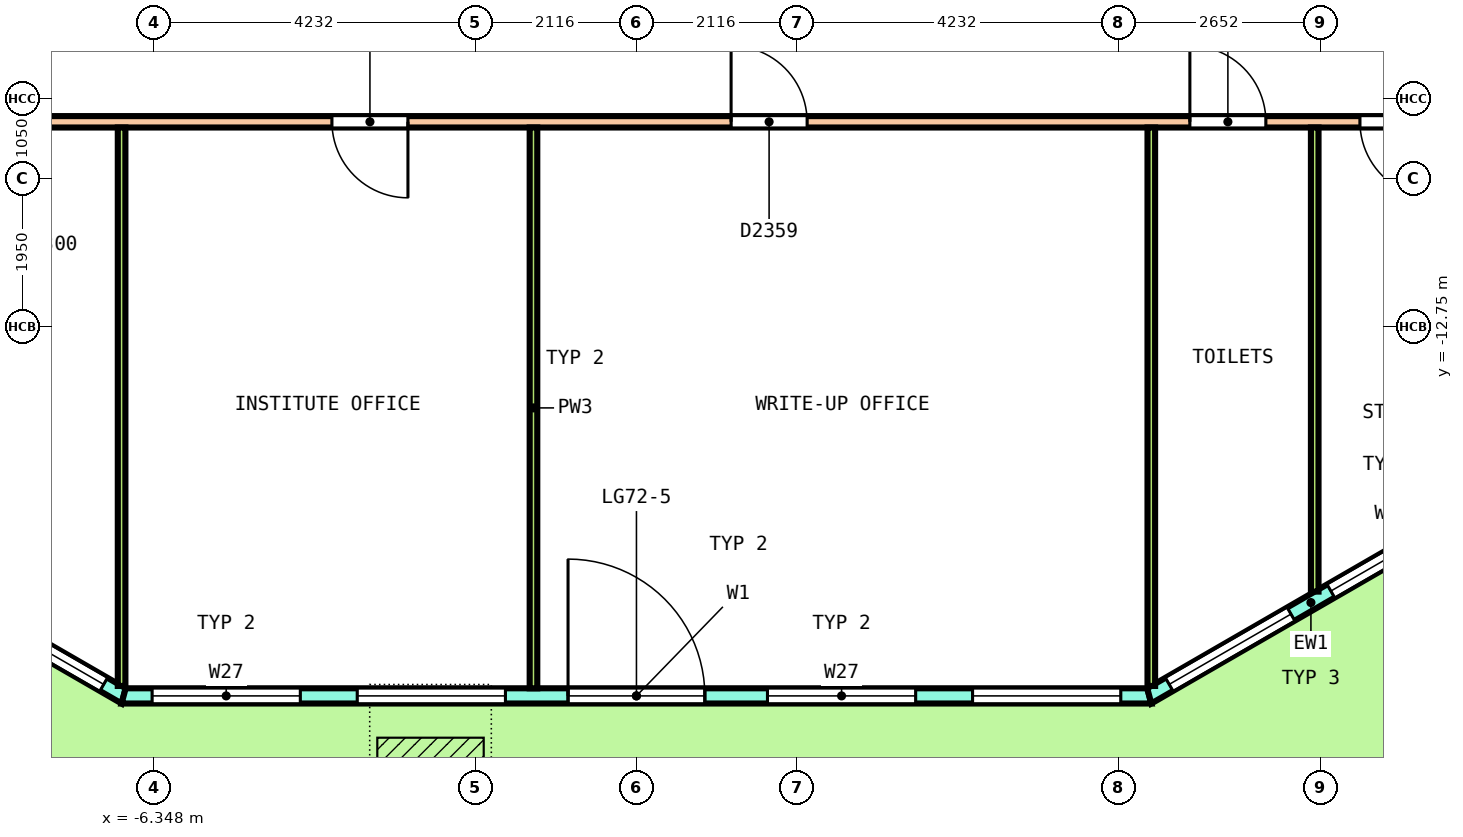
"""IFC4 building model, lengths in metres.
Left out: names, types, materials, properties, quantities, classifications, styles, units other than length and angle.
Written with IfcOpenShell. Run it as: python <this file> out.ifc"""

import sys

from ifc_helpers import new_model, si_unit, direction, frame, frame_2d, origin, origin_2d, place, context, subcontext, project, spatial, polyline, rectangle, outline, extrude, element, fill, save


model = new_model("IFC4")
c1 = context("Model", 3, precision=1e-05, world=origin(), true_north=direction((0.0, 1.0)))
c2 = subcontext(c1, "Body", "Model", "MODEL_VIEW")
j1 = project(units=[si_unit("LENGTHUNIT", "METRE"), si_unit("PLANEANGLEUNIT", "RADIAN")], contexts=[c1])
p1 = place(None, origin())
s1 = spatial("IfcSite", under=j1, at=p1, CompositionType="ELEMENT")
p2 = place(p1, origin())
s2 = spatial("IfcBuilding", under=s1, at=p2, CompositionType="ELEMENT")
p3 = place(p2, frame((0.0, 0.0, 324.6)))
s3 = spatial("IfcBuildingStorey", under=s2, at=p3, CompositionType="ELEMENT", Elevation=324.6)
p4 = place(p3, frame((10.273, -18.8, 0.0), z_axis=(-0.018115165867, -0.031417446337, 0.999342176049), x_axis=(0.865519692755, 0.499889378995, 0.031404939456)))
e1 = element("IfcColumn", 1, at=p4, inside=s3, PredefinedType="COLUMN", context=c2, shape_type="SweptSolid", body=[
    extrude(rectangle(XDim=0.85, YDim=0.85, at=origin_2d()), origin(), (0.0, 0.0, 1.0), 3.652),
])
p5 = place(p3, frame((-11.0, -15.147, 0.0), z_axis=(0.0, 0.0, 1.0), x_axis=(0.866029143232, -0.499993523031, 0.0)))
e2 = element("IfcWall", 2, at=p5, inside=s3, PredefinedType="SOLIDWALL", context=c2, shape_type="SweptSolid", body=[
    extrude(outline(polyline([(-0.027, -0.1), (1.214, -0.1), (2.456, -0.1), (3.697, -0.1), (4.938, -0.1), (4.885, 0.1), (3.67, 0.1), (2.456, 0.1), (1.241, 0.1), (0.027, 0.1), (-0.027, -0.1)])), origin(), (0.0, 0.0, 1.0), 3.7),
])
p6 = place(p5, frame((0.303, 0.0, 0.1)))
e3 = element("IfcOpeningElement", 3, at=p6, cuts=e2, PredefinedType="OPENING", context=c2, shape_type="SweptSolid", body=[
    extrude(rectangle(XDim=1.85, YDim=2.9, at=frame_2d((0.925, 1.45))), frame((0.0, 0.11, 0.0), z_axis=(0.0, -1.0, 0.0), x_axis=(1.0, 0.0, 0.0)), (0.0, 0.0, 1.0), 0.22),
])
p7 = place(p5, frame((2.759, 0.0, 0.1)))
e4 = element("IfcOpeningElement", 4, at=p7, cuts=e2, PredefinedType="OPENING", context=c2, shape_type="SweptSolid", body=[
    extrude(rectangle(XDim=1.85, YDim=2.9, at=frame_2d((0.925, 1.45))), frame((0.0, 0.11, 0.0), z_axis=(0.0, -1.0, 0.0), x_axis=(1.0, 0.0, 0.0)), (0.0, 0.0, 1.0), 0.22),
])
p8 = place(p3, frame((-6.747, -17.603, 0.0), z_axis=(0.0, 0.0, 1.0), x_axis=(1.0, 0.0, 0.0)))
e5 = element("IfcWall", 5, at=p8, inside=s3, PredefinedType="SOLIDWALL", context=c2, shape_type="SweptSolid", body=[
    extrude(outline(polyline([(-0.027, -0.1), (1.015, -0.1), (2.057, -0.1), (3.099, -0.1), (4.141, -0.1), (5.184, -0.1), (6.226, -0.1), (7.268, -0.1), (8.31, -0.1), (9.352, -0.1), (10.394, -0.1), (11.436, -0.1), (12.478, -0.1), (13.52, -0.1), (13.466, 0.1), (12.433, 0.1), (11.399, 0.1), (10.365, 0.1), (9.331, 0.1), (8.297, 0.1), (7.263, 0.1), (6.23, 0.1), (5.196, 0.1), (4.162, 0.1), (3.128, 0.1), (2.094, 0.1), (1.061, 0.1), (0.027, 0.1), (-0.027, -0.1)])), origin(), (0.0, 0.0, 1.0), 3.7),
])
p9 = place(p8, frame((0.374, 0.0, 0.1)))
e6 = element("IfcOpeningElement", 6, at=p9, cuts=e5, PredefinedType="OPENING", context=c2, shape_type="SweptSolid", body=[
    extrude(rectangle(XDim=1.95, YDim=2.9, at=frame_2d((0.975, 1.45))), frame((0.0, 0.11, 0.0), z_axis=(0.0, -1.0, 0.0), x_axis=(1.0, 0.0, 0.0)), (0.0, 0.0, 1.0), 0.22),
])
p10 = place(p8, frame((3.073, 0.0, 0.1)))
e7 = element("IfcOpeningElement", 7, at=p10, cuts=e5, PredefinedType="OPENING", context=c2, shape_type="SweptSolid", body=[
    extrude(rectangle(XDim=1.95, YDim=2.9, at=frame_2d((0.975, 1.45))), frame((0.0, 0.11, 0.0), z_axis=(0.0, -1.0, 0.0), x_axis=(1.0, 0.0, 0.0)), (0.0, 0.0, 1.0), 0.22),
])
p11 = place(p8, frame((5.847, 0.0, 0.0)))
e8 = element("IfcOpeningElement", 8, at=p11, cuts=e5, PredefinedType="OPENING", context=c2, shape_type="SweptSolid", body=[
    extrude(rectangle(XDim=1.8, YDim=2.4, at=frame_2d((0.9, 1.2))), frame((0.0, 0.11, 0.0), z_axis=(0.0, -1.0, 0.0), x_axis=(1.0, 0.0, 0.0)), (0.0, 0.0, 1.0), 0.22),
])
p12 = place(p8, frame((5.847, 0.0, 2.55)))
e9 = element("IfcOpeningElement", 9, at=p12, cuts=e5, PredefinedType="OPENING", context=c2, shape_type="SweptSolid", body=[
    extrude(rectangle(XDim=1.8, YDim=0.45, at=frame_2d((0.9, 0.225))), frame((0.0, 0.11, 0.0), z_axis=(0.0, -1.0, 0.0), x_axis=(1.0, 0.0, 0.0)), (0.0, 0.0, 1.0), 0.22),
])
p13 = place(p8, frame((8.47, 0.0, 0.1)))
e10 = element("IfcOpeningElement", 10, at=p13, cuts=e5, PredefinedType="OPENING", context=c2, shape_type="SweptSolid", body=[
    extrude(rectangle(XDim=1.95, YDim=2.9, at=frame_2d((0.975, 1.45))), frame((0.0, 0.11, 0.0), z_axis=(0.0, -1.0, 0.0), x_axis=(1.0, 0.0, 0.0)), (0.0, 0.0, 1.0), 0.22),
])
p14 = place(p8, frame((11.169, 0.0, 0.1)))
e11 = element("IfcOpeningElement", 11, at=p14, cuts=e5, PredefinedType="OPENING", context=c2, shape_type="SweptSolid", body=[
    extrude(rectangle(XDim=1.95, YDim=2.9, at=frame_2d((0.975, 1.45))), frame((0.0, 0.11, 0.0), z_axis=(0.0, -1.0, 0.0), x_axis=(1.0, 0.0, 0.0)), (0.0, 0.0, 1.0), 0.22),
])
p15 = place(p3, frame((6.747, -17.603, 0.0), z_axis=(0.0, 0.0, 1.0), x_axis=(0.866029143232, 0.499993523031, 0.0)))
e12 = element("IfcWall", 12, at=p15, inside=s3, PredefinedType="SOLIDWALL", context=c2, shape_type="SweptSolid", body=[
    extrude(outline(polyline([(-0.027, -0.1), (1.214, -0.1), (2.456, -0.1), (3.697, -0.1), (4.938, -0.1), (4.885, 0.1), (3.67, 0.1), (2.456, 0.1), (1.241, 0.1), (0.027, 0.1), (-0.027, -0.1)])), origin(), (0.0, 0.0, 1.0), 3.7),
])
p16 = place(p15, frame((0.303, 0.0, 0.1)))
e13 = element("IfcOpeningElement", 13, at=p16, cuts=e12, PredefinedType="OPENING", context=c2, shape_type="SweptSolid", body=[
    extrude(rectangle(XDim=1.85, YDim=2.9, at=frame_2d((0.925, 1.45))), frame((0.0, 0.11, 0.0), z_axis=(0.0, -1.0, 0.0), x_axis=(1.0, 0.0, 0.0)), (0.0, 0.0, 1.0), 0.22),
])
p17 = place(p15, frame((2.759, 0.0, 0.1)))
e14 = element("IfcOpeningElement", 14, at=p17, cuts=e12, PredefinedType="OPENING", context=c2, shape_type="SweptSolid", body=[
    extrude(rectangle(XDim=1.85, YDim=2.9, at=frame_2d((0.925, 1.45))), frame((0.0, 0.11, 0.0), z_axis=(0.0, -1.0, 0.0), x_axis=(1.0, 0.0, 0.0)), (0.0, 0.0, 1.0), 0.22),
])
p18 = place(p3, frame((-11.025, -10.05, 0.0), z_axis=(0.0, 0.0, 1.0), x_axis=(1.0, 0.0, 0.0)))
e15 = element("IfcWall", 15, at=p18, inside=s3, PredefinedType="PARTITIONING", context=c2, shape_type="SweptSolid", body=[
    extrude(rectangle(XDim=21.925, YDim=0.15, at=frame_2d((10.962, 0.0))), origin(), (0.0, 0.0, 1.0), 3.05),
])
p19 = place(p18, frame((2.035, 0.0, 0.0)))
e16 = element("IfcOpeningElement", 16, at=p19, cuts=e15, PredefinedType="OPENING", context=c2, shape_type="SweptSolid", body=[
    extrude(rectangle(XDim=1.0, YDim=2.1, at=frame_2d((0.5, 1.05))), frame((0.0, 0.085, 0.0), z_axis=(0.0, -1.0, 0.0), x_axis=(1.0, 0.0, 0.0)), (0.0, 0.0, 1.0), 0.17),
])
p20 = place(p18, frame((7.019, 0.0, 0.0)))
e17 = element("IfcOpeningElement", 17, at=p20, cuts=e15, PredefinedType="OPENING", context=c2, shape_type="SweptSolid", body=[
    extrude(rectangle(XDim=1.0, YDim=2.1, at=frame_2d((0.5, 1.05))), frame((0.0, 0.085, 0.0), z_axis=(0.0, -1.0, 0.0), x_axis=(1.0, 0.0, 0.0)), (0.0, 0.0, 1.0), 0.17),
])
p21 = place(p18, frame((12.27, 0.0, 0.0)))
e18 = element("IfcOpeningElement", 18, at=p21, cuts=e15, PredefinedType="OPENING", context=c2, shape_type="SweptSolid", body=[
    extrude(rectangle(XDim=1.0, YDim=2.1, at=frame_2d((0.5, 1.05))), frame((0.0, 0.085, 0.0), z_axis=(0.0, -1.0, 0.0), x_axis=(1.0, 0.0, 0.0)), (0.0, 0.0, 1.0), 0.17),
])
p22 = place(p18, frame((18.306, 0.0, 0.0)))
e19 = element("IfcOpeningElement", 19, at=p22, cuts=e15, PredefinedType="OPENING", context=c2, shape_type="SweptSolid", body=[
    extrude(rectangle(XDim=1.0, YDim=2.1, at=frame_2d((0.5, 1.05))), frame((0.0, 0.085, 0.0), z_axis=(0.0, -1.0, 0.0), x_axis=(1.0, 0.0, 0.0)), (0.0, 0.0, 1.0), 0.17),
])
p23 = place(p18, frame((20.543, 0.0, 0.0)))
e20 = element("IfcOpeningElement", 20, at=p23, cuts=e15, PredefinedType="OPENING", context=c2, shape_type="SweptSolid", body=[
    extrude(rectangle(XDim=1.0, YDim=2.1, at=frame_2d((0.5, 1.05))), frame((0.0, 0.085, 0.0), z_axis=(0.0, -1.0, 0.0), x_axis=(1.0, 0.0, 0.0)), (0.0, 0.0, 1.0), 0.17),
])
p24 = place(p3, frame((-6.773, -17.472, 0.0), z_axis=(0.0, 0.0, 1.0), x_axis=(0.0, 1.0, 0.0)))
e21 = element("IfcWall", 21, at=p24, inside=s3, PredefinedType="PARTITIONING", context=c2, shape_type="SweptSolid", body=[
    extrude(rectangle(XDim=7.347, YDim=0.1, at=frame_2d((3.673, 0.0))), origin(), (0.0, 0.0, 1.0), 3.05),
])
p25 = place(p3, frame((-1.355, -17.503, 0.0), z_axis=(0.0, 0.0, 1.0), x_axis=(0.0, 1.0, 0.0)))
e22 = element("IfcWall", 22, at=p25, inside=s3, PredefinedType="PARTITIONING", context=c2, shape_type="SweptSolid", body=[
    extrude(rectangle(XDim=7.378, YDim=0.1, at=frame_2d((3.689, 0.0))), origin(), (0.0, 0.0, 1.0), 3.05),
])
p26 = place(p3, frame((6.773, -17.472, 0.0), z_axis=(0.0, 0.0, 1.0), x_axis=(0.0, 1.0, 0.0)))
e23 = element("IfcWall", 23, at=p26, inside=s3, PredefinedType="PARTITIONING", context=c2, shape_type="SweptSolid", body=[
    extrude(rectangle(XDim=7.347, YDim=0.1, at=frame_2d((3.673, 0.0))), origin(), (0.0, 0.0, 1.0), 3.05),
])
p27 = place(p3, frame((8.924, -16.231, 0.0), z_axis=(0.0, 0.0, 1.0), x_axis=(0.0, 1.0, 0.0)))
e24 = element("IfcWall", 24, at=p27, inside=s3, PredefinedType="PARTITIONING", context=c2, shape_type="SweptSolid", body=[
    extrude(rectangle(XDim=6.106, YDim=0.1, at=frame_2d((3.053, 0.0))), origin(), (0.0, 0.0, 1.0), 3.05),
])
p28 = place(p7, origin())
e25 = element("IfcWindow", 25, at=p28, inside=s3, PartitioningType="SINGLE_PANEL", PredefinedType="WINDOW", context=c2, shape_type="SweptSolid", body=[
    extrude(rectangle(XDim=1.85, YDim=2.9, at=frame_2d((0.925, 1.45))), frame((0.0, 0.03, 0.0), z_axis=(0.0, -1.0, 0.0), x_axis=(1.0, 0.0, 0.0)), (0.0, 0.0, 1.0), 0.06),
])
fill(e4, e25)
p29 = place(p9, origin())
e26 = element("IfcWindow", 26, at=p29, inside=s3, PartitioningType="SINGLE_PANEL", PredefinedType="WINDOW", context=c2, shape_type="SweptSolid", body=[
    extrude(rectangle(XDim=1.95, YDim=2.9, at=frame_2d((0.975, 1.45))), frame((0.0, 0.03, 0.0), z_axis=(0.0, -1.0, 0.0), x_axis=(1.0, 0.0, 0.0)), (0.0, 0.0, 1.0), 0.06),
])
fill(e6, e26)
p30 = place(p10, origin())
e27 = element("IfcWindow", 27, at=p30, inside=s3, PartitioningType="SINGLE_PANEL", PredefinedType="WINDOW", context=c2, shape_type="SweptSolid", body=[
    extrude(rectangle(XDim=1.95, YDim=2.9, at=frame_2d((0.975, 1.45))), frame((0.0, 0.03, 0.0), z_axis=(0.0, -1.0, 0.0), x_axis=(1.0, 0.0, 0.0)), (0.0, 0.0, 1.0), 0.06),
])
fill(e7, e27)
p31 = place(p11, origin())
e28 = element("IfcDoor", 28, at=p31, inside=s3, OperationType="DOUBLE_DOOR_SINGLE_SWING", PredefinedType="DOOR", context=c2, shape_type="SweptSolid", body=[
    extrude(rectangle(XDim=1.8, YDim=2.4, at=frame_2d((0.9, 1.2))), frame((0.0, 0.025, 0.0), z_axis=(0.0, -1.0, 0.0), x_axis=(1.0, 0.0, 0.0)), (0.0, 0.0, 1.0), 0.05),
])
fill(e8, e28)
p32 = place(p12, origin())
e29 = element("IfcWindow", 29, at=p32, inside=s3, PartitioningType="SINGLE_PANEL", PredefinedType="WINDOW", context=c2, shape_type="SweptSolid", body=[
    extrude(rectangle(XDim=1.8, YDim=0.45, at=frame_2d((0.9, 0.225))), frame((0.0, 0.03, 0.0), z_axis=(0.0, -1.0, 0.0), x_axis=(1.0, 0.0, 0.0)), (0.0, 0.0, 1.0), 0.06),
])
fill(e9, e29)
p33 = place(p13, origin())
e30 = element("IfcWindow", 30, at=p33, inside=s3, PartitioningType="SINGLE_PANEL", PredefinedType="WINDOW", context=c2, shape_type="SweptSolid", body=[
    extrude(rectangle(XDim=1.95, YDim=2.9, at=frame_2d((0.975, 1.45))), frame((0.0, 0.03, 0.0), z_axis=(0.0, -1.0, 0.0), x_axis=(1.0, 0.0, 0.0)), (0.0, 0.0, 1.0), 0.06),
])
fill(e10, e30)
p34 = place(p14, origin())
e31 = element("IfcWindow", 31, at=p34, inside=s3, PartitioningType="SINGLE_PANEL", PredefinedType="WINDOW", context=c2, shape_type="SweptSolid", body=[
    extrude(rectangle(XDim=1.95, YDim=2.9, at=frame_2d((0.975, 1.45))), frame((0.0, 0.03, 0.0), z_axis=(0.0, -1.0, 0.0), x_axis=(1.0, 0.0, 0.0)), (0.0, 0.0, 1.0), 0.06),
])
fill(e11, e31)
p35 = place(p16, origin())
e32 = element("IfcWindow", 32, at=p35, inside=s3, PartitioningType="SINGLE_PANEL", PredefinedType="WINDOW", context=c2, shape_type="SweptSolid", body=[
    extrude(rectangle(XDim=1.85, YDim=2.9, at=frame_2d((0.925, 1.45))), frame((0.0, 0.03, 0.0), z_axis=(0.0, -1.0, 0.0), x_axis=(1.0, 0.0, 0.0)), (0.0, 0.0, 1.0), 0.06),
])
fill(e13, e32)
p36 = place(p17, origin())
e33 = element("IfcWindow", 33, at=p36, inside=s3, PartitioningType="SINGLE_PANEL", PredefinedType="WINDOW", context=c2, shape_type="SweptSolid", body=[
    extrude(rectangle(XDim=1.85, YDim=2.9, at=frame_2d((0.925, 1.45))), frame((0.0, 0.03, 0.0), z_axis=(0.0, -1.0, 0.0), x_axis=(1.0, 0.0, 0.0)), (0.0, 0.0, 1.0), 0.06),
])
fill(e14, e33)
p37 = place(p20, origin())
e34 = element("IfcDoor", 34, at=p37, inside=s3, OperationType="SINGLE_SWING_LEFT", PredefinedType="DOOR", context=c2, shape_type="SweptSolid", body=[
    extrude(rectangle(XDim=1.0, YDim=2.1, at=frame_2d((0.5, 1.05))), frame((0.0, 0.025, 0.0), z_axis=(0.0, -1.0, 0.0), x_axis=(1.0, 0.0, 0.0)), (0.0, 0.0, 1.0), 0.05),
])
fill(e17, e34)
p38 = place(p21, origin())
e35 = element("IfcDoor", 35, at=p38, inside=s3, OperationType="SINGLE_SWING_LEFT", PredefinedType="DOOR", context=c2, shape_type="SweptSolid", body=[
    extrude(rectangle(XDim=1.0, YDim=2.1, at=frame_2d((0.5, 1.05))), frame((0.0, 0.025, 0.0), z_axis=(0.0, -1.0, 0.0), x_axis=(1.0, 0.0, 0.0)), (0.0, 0.0, 1.0), 0.05),
])
fill(e18, e35)
p39 = place(p22, origin())
e36 = element("IfcDoor", 36, at=p39, inside=s3, OperationType="SINGLE_SWING_LEFT", PredefinedType="DOOR", context=c2, shape_type="SweptSolid", body=[
    extrude(rectangle(XDim=1.0, YDim=2.1, at=frame_2d((0.5, 1.05))), frame((0.0, 0.025, 0.0), z_axis=(0.0, -1.0, 0.0), x_axis=(1.0, 0.0, 0.0)), (0.0, 0.0, 1.0), 0.05),
])
fill(e19, e36)
p40 = place(p23, origin())
e37 = element("IfcDoor", 37, at=p40, inside=s3, OperationType="SINGLE_SWING_RIGHT", PredefinedType="DOOR", context=c2, shape_type="SweptSolid", body=[
    extrude(rectangle(XDim=1.0, YDim=2.1, at=frame_2d((0.5, 1.05))), frame((0.0, 0.025, 0.0), z_axis=(0.0, -1.0, 0.0), x_axis=(1.0, 0.0, 0.0)), (0.0, 0.0, 1.0), 0.05),
])
fill(e20, e37)
save(model, sys.argv[1])
